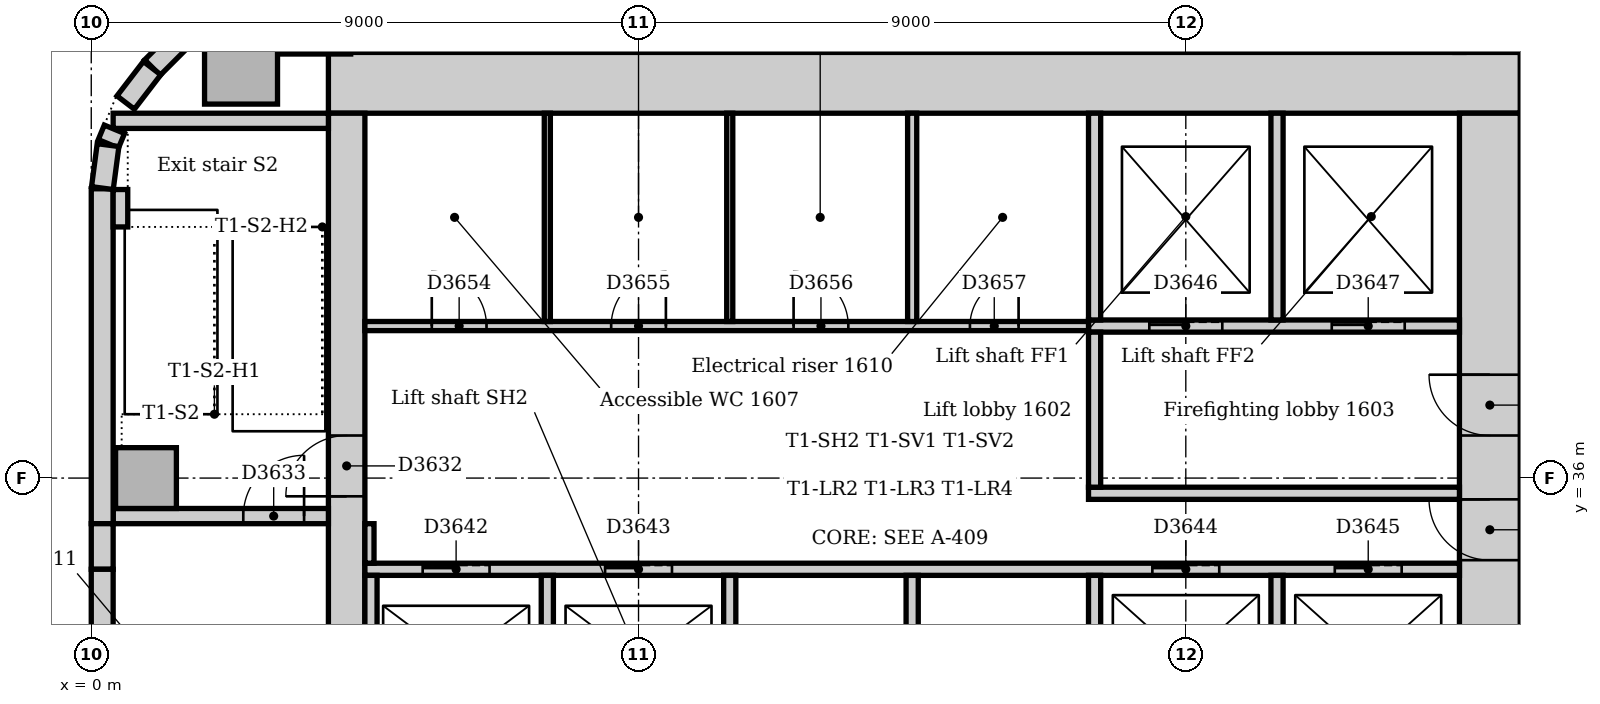
"""IFC4 building model, lengths in metres.
Left out: names, types, materials, properties, quantities, classifications, styles, units other than length and angle.
Written with IfcOpenShell. Run it as: python <this file> out.ifc"""

import sys

from ifc_helpers import new_model, si_unit, direction, frame, frame_2d, origin, origin_2d, place, context, subcontext, project, spatial, rectangle, extrude, element, fill, save


model = new_model("IFC4")
c1 = context("Model", 3, precision=1e-05, world=origin(), true_north=direction((0.0, 1.0)))
c2 = subcontext(c1, "Body", "Model", "MODEL_VIEW")
j1 = project(units=[si_unit("LENGTHUNIT", "METRE"), si_unit("PLANEANGLEUNIT", "RADIAN")], contexts=[c1])
p1 = place(None, origin())
s1 = spatial("IfcSite", under=j1, at=p1, CompositionType="ELEMENT")
p2 = place(p1, origin())
s2 = spatial("IfcBuilding", under=s1, at=p2, CompositionType="ELEMENT")
p3 = place(p2, frame((0.0, 0.0, 71.0)))
s3 = spatial("IfcBuildingStorey", under=s2, at=p3, CompositionType="ELEMENT", Elevation=71.0)
p4 = place(p3, frame((23.5, 42.5, 0.0), z_axis=(0.0, 0.0, 1.0), x_axis=(-1.0, 0.0, 0.0)))
e1 = element("IfcWall", 1, at=p4, inside=s3, PredefinedType="SOLIDWALL", context=c2, shape_type="SweptSolid", body=[
    extrude(rectangle(XDim=19.6, YDim=1.0, at=frame_2d((9.8, 0.0))), origin(), (0.0, 0.0, 1.0), 4.0),
])
p5 = place(p3, frame((23.0, 31.5, 0.0), z_axis=(0.0, 0.0, 1.0), x_axis=(0.0, 1.0, 0.0)))
e2 = element("IfcWall", 2, at=p5, inside=s3, PredefinedType="SOLIDWALL", context=c2, shape_type="SweptSolid", body=[
    extrude(rectangle(XDim=10.5, YDim=1.0, at=frame_2d((5.25, 0.0))), origin(), (0.0, 0.0, 1.0), 4.0),
])
p6 = place(p5, frame((3.15, 0.0, 0.0)))
e3 = element("IfcOpeningElement", 3, at=p6, cuts=e2, PredefinedType="OPENING", context=c2, shape_type="SweptSolid", body=[
    extrude(rectangle(XDim=1.0, YDim=2.1, at=frame_2d((0.5, 1.05))), frame((0.0, 0.51, 0.0), z_axis=(0.0, -1.0, 0.0), x_axis=(1.0, 0.0, 0.0)), (0.0, 0.0, 1.0), 1.02),
])
p7 = place(p5, frame((5.2, 0.0, 0.0)))
e4 = element("IfcOpeningElement", 4, at=p7, cuts=e2, PredefinedType="OPENING", context=c2, shape_type="SweptSolid", body=[
    extrude(rectangle(XDim=1.0, YDim=2.1, at=frame_2d((0.5, 1.05))), frame((0.0, 0.51, 0.0), z_axis=(0.0, -1.0, 0.0), x_axis=(1.0, 0.0, 0.0)), (0.0, 0.0, 1.0), 1.02),
])
p8 = place(p3, frame((4.2, 42.0, 0.0), z_axis=(0.0, 0.0, 1.0), x_axis=(0.0, -1.0, 0.0)))
e5 = element("IfcWall", 5, at=p8, inside=s3, PredefinedType="SOLIDWALL", context=c2, shape_type="SweptSolid", body=[
    extrude(rectangle(XDim=10.5, YDim=0.6, at=frame_2d((5.25, 0.0))), origin(), (0.0, 0.0, 1.0), 4.0),
])
p9 = place(p8, frame((5.3, 0.0, 0.0)))
e6 = element("IfcOpeningElement", 6, at=p9, cuts=e5, PredefinedType="OPENING", context=c2, shape_type="SweptSolid", body=[
    extrude(rectangle(XDim=1.0, YDim=2.1, at=frame_2d((0.5, 1.05))), frame((0.0, 0.31, 0.0), z_axis=(0.0, -1.0, 0.0), x_axis=(1.0, 0.0, 0.0)), (0.0, 0.0, 1.0), 0.62),
])
p10 = place(p3, frame((0.36, 35.375, 0.0), z_axis=(0.0, 0.0, 1.0), x_axis=(1.0, 0.0, 0.0)))
e7 = element("IfcWall", 7, at=p10, inside=s3, PredefinedType="SOLIDWALL", context=c2, shape_type="SweptSolid", body=[
    extrude(rectangle(XDim=3.54, YDim=0.25, at=frame_2d((1.77, 0.0))), origin(), (0.0, 0.0, 1.0), 4.0),
])
p11 = place(p10, frame((2.14, 0.0, 0.0)))
e8 = element("IfcOpeningElement", 8, at=p11, cuts=e7, PredefinedType="OPENING", context=c2, shape_type="SweptSolid", body=[
    extrude(rectangle(XDim=1.0, YDim=2.1, at=frame_2d((0.5, 1.05))), frame((0.0, 0.135, 0.0), z_axis=(0.0, -1.0, 0.0), x_axis=(1.0, 0.0, 0.0)), (0.0, 0.0, 1.0), 0.27),
])
p12 = place(p3, frame((3.9, 41.875, 0.0), z_axis=(0.0, 0.0, 1.0), x_axis=(-1.0, 0.0, 0.0)))
e9 = element("IfcWall", 9, at=p12, inside=s3, PredefinedType="SOLIDWALL", context=c2, shape_type="SweptSolid", body=[
    extrude(rectangle(XDim=3.54, YDim=0.25, at=frame_2d((1.77, 0.0))), origin(), (0.0, 0.0, 1.0), 4.0),
])
for number, where, z_axis, x_axis in (
    (10, (3.667, 43.574, 0.0), (0.0, 0.0, 1.0), (1.0, 0.0, 0.0)),
    (11, (2.463, 42.75, 0.0), (0.0, 0.0, 1.0), (1.0, 0.0, 0.0)),
):
    element("IfcColumn", number, at=place(p3, frame(where, z_axis=z_axis, x_axis=x_axis)), inside=s3, PredefinedType="COLUMN", context=c2, shape_type="SweptSolid", body=[
        extrude(rectangle(XDim=1.2, YDim=1.2, at=origin_2d()), origin(), (0.0, 0.0, 1.0), 3.85),
    ])
p13 = place(p3, frame((0.9, 36.0, 0.0), z_axis=(0.0, 0.0, 1.0), x_axis=(1.0, 0.0, 0.0)))
e12 = element("IfcColumn", 12, at=p13, inside=s3, PredefinedType="COLUMN", context=c2, shape_type="SweptSolid", body=[
    extrude(rectangle(XDim=1.0, YDim=1.0, at=origin_2d()), origin(), (0.0, 0.0, 1.0), 4.0),
])
p14 = place(p3, frame((2.249, 43.994, 0.0), z_axis=(0.0, 0.0, 1.0), x_axis=(-0.707106781187, -0.707106781187, 0.0)))
e13 = element("IfcWall", 13, at=p14, inside=s3, PredefinedType="STANDARD", context=c2, shape_type="SweptSolid", body=[
    extrude(rectangle(XDim=1.757, YDim=0.36, at=frame_2d((0.879, 0.0))), origin(), (0.0, 0.0, 1.0), 3.85),
])
p15 = place(p3, frame((0.18, 40.757, 0.0), z_axis=(0.0, 0.0, 1.0), x_axis=(0.0, -1.0, 0.0)))
e14 = element("IfcWall", 14, at=p15, inside=s3, PredefinedType="STANDARD", context=c2, shape_type="SweptSolid", body=[
    extrude(rectangle(XDim=5.507, YDim=0.36, at=frame_2d((2.754, 0.0))), origin(), (0.0, 0.0, 1.0), 3.85),
])
p16 = place(p3, frame((0.18, 35.25, 0.0), z_axis=(0.0, 0.0, 1.0), x_axis=(0.0, -1.0, 0.0)))
e15 = element("IfcWall", 15, at=p16, inside=s3, PredefinedType="STANDARD", context=c2, shape_type="SweptSolid", body=[
    extrude(rectangle(XDim=0.75, YDim=0.36, at=frame_2d((0.375, 0.0))), origin(), (0.0, 0.0, 1.0), 3.85),
])
p17 = place(p3, frame((0.18, 34.5, 0.0), z_axis=(0.0, 0.0, 1.0), x_axis=(0.0, -1.0, 0.0)))
e16 = element("IfcWall", 16, at=p17, inside=s3, PredefinedType="STANDARD", context=c2, shape_type="SweptSolid", body=[
    extrude(rectangle(XDim=6.0, YDim=0.36, at=frame_2d((3.0, 0.0))), origin(), (0.0, 0.0, 1.0), 3.85),
])
p18 = place(p17, frame((2.1, 0.0, 0.0)))
e17 = element("IfcOpeningElement", 17, at=p18, cuts=e16, PredefinedType="OPENING", context=c2, shape_type="SweptSolid", body=[
    extrude(rectangle(XDim=1.8, YDim=2.4, at=frame_2d((0.9, 1.2))), frame((0.0, 0.19, 0.0), z_axis=(0.0, -1.0, 0.0), x_axis=(1.0, 0.0, 0.0)), (0.0, 0.0, 1.0), 0.38),
])
p19 = place(p3, frame((1.0, 42.741, 0.0), z_axis=(0.0, 0.0, 1.0), x_axis=(-0.608802368033, -0.793321924995, 0.0)))
e18 = element("IfcWall", 18, at=p19, inside=s3, PredefinedType="STANDARD", context=c2, shape_type="SweptSolid", body=[
    extrude(rectangle(XDim=0.713, YDim=0.36, at=frame_2d((0.357, 0.0))), origin(), (0.0, 0.0, 1.0), 3.85),
])
p20 = place(p3, frame((0.381, 41.736, 0.0), z_axis=(0.0, 0.0, 1.0), x_axis=(-0.382773360986, -0.923842277729, 0.0)))
e19 = element("IfcWall", 19, at=p20, inside=s3, PredefinedType="STANDARD", context=c2, shape_type="SweptSolid", body=[
    extrude(rectangle(XDim=0.258, YDim=0.36, at=frame_2d((0.129, 0.0))), origin(), (0.0, 0.0, 1.0), 3.85),
])
p21 = place(p3, frame((0.276, 41.476, 0.0), z_axis=(0.0, 0.0, 1.0), x_axis=(-0.13055608231, -0.99144092581, 0.0)))
e20 = element("IfcWall", 20, at=p21, inside=s3, PredefinedType="STANDARD", context=c2, shape_type="SweptSolid", body=[
    extrude(rectangle(XDim=0.713, YDim=0.36, at=frame_2d((0.356, 0.0))), origin(), (0.0, 0.0, 1.0), 3.85),
])
p22 = place(p3, frame((0.48, 40.13, 0.0), z_axis=(0.0, 0.0, 1.0), x_axis=(0.0, 1.0, 0.0)))
e21 = element("IfcWall", 21, at=p22, inside=s3, PredefinedType="STANDARD", context=c2, shape_type="SweptSolid", body=[
    extrude(rectangle(XDim=0.615, YDim=0.24, at=frame_2d((0.307, 0.0))), origin(), (0.0, 0.0, 1.0), 4.0),
])
p23 = place(p3, frame((16.4, 35.75, 0.0), z_axis=(0.0, 0.0, 1.0), x_axis=(1.0, 0.0, 0.0)))
e22 = element("IfcWall", 22, at=p23, inside=s3, PredefinedType="PARTITIONING", context=c2, shape_type="SweptSolid", body=[
    extrude(rectangle(XDim=6.1, YDim=0.2, at=frame_2d((3.05, 0.0))), origin(), (0.0, 0.0, 1.0), 3.85),
])
p24 = place(p3, frame((16.4, 38.5, 0.0), z_axis=(0.0, 0.0, 1.0), x_axis=(1.0, 0.0, 0.0)))
e23 = element("IfcWall", 23, at=p24, inside=s3, PredefinedType="PARTITIONING", context=c2, shape_type="SweptSolid", body=[
    extrude(rectangle(XDim=6.1, YDim=0.2, at=frame_2d((3.05, 0.0))), origin(), (0.0, 0.0, 1.0), 3.85),
])
p25 = place(p24, frame((1.0, 0.0, 0.0)))
e24 = element("IfcOpeningElement", 24, at=p25, cuts=e23, PredefinedType="OPENING", context=c2, shape_type="SweptSolid", body=[
    extrude(rectangle(XDim=1.2, YDim=2.1, at=frame_2d((0.6, 1.05))), frame((0.0, 0.11, 0.0), z_axis=(0.0, -1.0, 0.0), x_axis=(1.0, 0.0, 0.0)), (0.0, 0.0, 1.0), 0.22),
])
p26 = place(p24, frame((4.0, 0.0, 0.0)))
e25 = element("IfcOpeningElement", 25, at=p26, cuts=e23, PredefinedType="OPENING", context=c2, shape_type="SweptSolid", body=[
    extrude(rectangle(XDim=1.2, YDim=2.1, at=frame_2d((0.6, 1.05))), frame((0.0, 0.11, 0.0), z_axis=(0.0, -1.0, 0.0), x_axis=(1.0, 0.0, 0.0)), (0.0, 0.0, 1.0), 0.22),
])
p27 = place(p3, frame((16.5, 35.85, 0.0), z_axis=(0.0, 0.0, 1.0), x_axis=(0.0, 1.0, 0.0)))
e26 = element("IfcWall", 26, at=p27, inside=s3, PredefinedType="PARTITIONING", context=c2, shape_type="SweptSolid", body=[
    extrude(rectangle(XDim=2.55, YDim=0.2, at=frame_2d((1.275, 0.0))), origin(), (0.0, 0.0, 1.0), 3.85),
])
p28 = place(p3, frame((4.5, 34.5, 0.0), z_axis=(0.0, 0.0, 1.0), x_axis=(1.0, 0.0, 0.0)))
e27 = element("IfcWall", 27, at=p28, inside=s3, PredefinedType="PARTITIONING", context=c2, shape_type="SweptSolid", body=[
    extrude(rectangle(XDim=18.0, YDim=0.2, at=frame_2d((9.0, 0.0))), origin(), (0.0, 0.0, 1.0), 3.85),
])
p29 = place(p28, frame((0.95, 0.0, 0.0)))
e28 = element("IfcOpeningElement", 28, at=p29, cuts=e27, PredefinedType="OPENING", context=c2, shape_type="SweptSolid", body=[
    extrude(rectangle(XDim=1.1, YDim=2.1, at=frame_2d((0.55, 1.05))), frame((0.0, 0.11, 0.0), z_axis=(0.0, -1.0, 0.0), x_axis=(1.0, 0.0, 0.0)), (0.0, 0.0, 1.0), 0.22),
])
p30 = place(p28, frame((3.95, 0.0, 0.0)))
e29 = element("IfcOpeningElement", 29, at=p30, cuts=e27, PredefinedType="OPENING", context=c2, shape_type="SweptSolid", body=[
    extrude(rectangle(XDim=1.1, YDim=2.1, at=frame_2d((0.55, 1.05))), frame((0.0, 0.11, 0.0), z_axis=(0.0, -1.0, 0.0), x_axis=(1.0, 0.0, 0.0)), (0.0, 0.0, 1.0), 0.22),
])
p31 = place(p28, frame((12.95, 0.0, 0.0)))
e30 = element("IfcOpeningElement", 30, at=p31, cuts=e27, PredefinedType="OPENING", context=c2, shape_type="SweptSolid", body=[
    extrude(rectangle(XDim=1.1, YDim=2.1, at=frame_2d((0.55, 1.05))), frame((0.0, 0.11, 0.0), z_axis=(0.0, -1.0, 0.0), x_axis=(1.0, 0.0, 0.0)), (0.0, 0.0, 1.0), 0.22),
])
p32 = place(p28, frame((15.95, 0.0, 0.0)))
e31 = element("IfcOpeningElement", 31, at=p32, cuts=e27, PredefinedType="OPENING", context=c2, shape_type="SweptSolid", body=[
    extrude(rectangle(XDim=1.1, YDim=2.1, at=frame_2d((0.55, 1.05))), frame((0.0, 0.11, 0.0), z_axis=(0.0, -1.0, 0.0), x_axis=(1.0, 0.0, 0.0)), (0.0, 0.0, 1.0), 0.22),
])
for number, where, z_axis, x_axis in (
    (32, (16.5, 38.6, 0.0), (0.0, 0.0, 1.0), (0.0, 1.0, 0.0)),
    (33, (19.5, 38.6, 0.0), (0.0, 0.0, 1.0), (0.0, 1.0, 0.0)),
):
    element("IfcWall", number, at=place(p3, frame(where, z_axis=z_axis, x_axis=x_axis)), inside=s3, PredefinedType="PARTITIONING", context=c2, shape_type="SweptSolid", body=[
        extrude(rectangle(XDim=3.4, YDim=0.2, at=frame_2d((1.7, 0.0))), origin(), (0.0, 0.0, 1.0), 3.85),
    ])
for number, where, z_axis, x_axis in (
    (34, (4.6, 31.75, 0.0), (0.0, 0.0, 1.0), (0.0, 1.0, 0.0)),
    (35, (7.5, 31.75, 0.0), (0.0, 0.0, 1.0), (0.0, 1.0, 0.0)),
    (36, (10.5, 31.75, 0.0), (0.0, 0.0, 1.0), (0.0, 1.0, 0.0)),
    (37, (13.5, 31.75, 0.0), (0.0, 0.0, 1.0), (0.0, 1.0, 0.0)),
    (38, (16.5, 31.75, 0.0), (0.0, 0.0, 1.0), (0.0, 1.0, 0.0)),
    (39, (19.5, 31.75, 0.0), (0.0, 0.0, 1.0), (0.0, 1.0, 0.0)),
):
    element("IfcWall", number, at=place(p3, frame(where, z_axis=z_axis, x_axis=x_axis)), inside=s3, PredefinedType="PARTITIONING", context=c2, shape_type="SweptSolid", body=[
        extrude(rectangle(XDim=2.65, YDim=0.2, at=frame_2d((1.325, 0.0))), origin(), (0.0, 0.0, 1.0), 3.85),
    ])
p33 = place(p3, frame((4.5, 38.5, 0.0), z_axis=(0.0, 0.0, 1.0), x_axis=(1.0, 0.0, 0.0)))
e40 = element("IfcWall", 40, at=p33, inside=s3, PredefinedType="PARTITIONING", context=c2, shape_type="SweptSolid", body=[
    extrude(rectangle(XDim=11.9, YDim=0.15, at=frame_2d((5.95, 0.0))), origin(), (0.0, 0.0, 1.0), 3.85),
])
p34 = place(p33, frame((1.1, 0.0, 0.0)))
e41 = element("IfcOpeningElement", 41, at=p34, cuts=e40, PredefinedType="OPENING", context=c2, shape_type="SweptSolid", body=[
    extrude(rectangle(XDim=0.9, YDim=2.1, at=frame_2d((0.45, 1.05))), frame((0.0, 0.085, 0.0), z_axis=(0.0, -1.0, 0.0), x_axis=(1.0, 0.0, 0.0)), (0.0, 0.0, 1.0), 0.17),
])
p35 = place(p33, frame((4.05, 0.0, 0.0)))
e42 = element("IfcOpeningElement", 42, at=p35, cuts=e40, PredefinedType="OPENING", context=c2, shape_type="SweptSolid", body=[
    extrude(rectangle(XDim=0.9, YDim=2.1, at=frame_2d((0.45, 1.05))), frame((0.0, 0.085, 0.0), z_axis=(0.0, -1.0, 0.0), x_axis=(1.0, 0.0, 0.0)), (0.0, 0.0, 1.0), 0.17),
])
p36 = place(p33, frame((7.05, 0.0, 0.0)))
e43 = element("IfcOpeningElement", 43, at=p36, cuts=e40, PredefinedType="OPENING", context=c2, shape_type="SweptSolid", body=[
    extrude(rectangle(XDim=0.9, YDim=2.1, at=frame_2d((0.45, 1.05))), frame((0.0, 0.085, 0.0), z_axis=(0.0, -1.0, 0.0), x_axis=(1.0, 0.0, 0.0)), (0.0, 0.0, 1.0), 0.17),
])
p37 = place(p33, frame((9.95, 0.0, 0.0)))
e44 = element("IfcOpeningElement", 44, at=p37, cuts=e40, PredefinedType="OPENING", context=c2, shape_type="SweptSolid", body=[
    extrude(rectangle(XDim=0.8, YDim=2.1, at=frame_2d((0.4, 1.05))), frame((0.0, 0.085, 0.0), z_axis=(0.0, -1.0, 0.0), x_axis=(1.0, 0.0, 0.0)), (0.0, 0.0, 1.0), 0.17),
])
p38 = place(p3, frame((4.575, 34.6, 0.0), z_axis=(0.0, 0.0, 1.0), x_axis=(0.0, 1.0, 0.0)))
e45 = element("IfcWall", 45, at=p38, inside=s3, PredefinedType="PARTITIONING", context=c2, shape_type="SweptSolid", body=[
    extrude(rectangle(XDim=0.65, YDim=0.15, at=frame_2d((0.325, 0.0))), origin(), (0.0, 0.0, 1.0), 3.85),
])
p39 = place(p3, frame((13.5, 38.575, 0.0), z_axis=(0.0, 0.0, 1.0), x_axis=(0.0, 1.0, 0.0)))
e46 = element("IfcWall", 46, at=p39, inside=s3, PredefinedType="PARTITIONING", context=c2, shape_type="SweptSolid", body=[
    extrude(rectangle(XDim=3.425, YDim=0.15, at=frame_2d((1.712, 0.0))), origin(), (0.0, 0.0, 1.0), 3.85),
])
for number, where, z_axis, x_axis in (
    (47, (7.5, 38.575, 0.0), (0.0, 0.0, 1.0), (0.0, 1.0, 0.0)),
    (48, (10.5, 38.575, 0.0), (0.0, 0.0, 1.0), (0.0, 1.0, 0.0)),
):
    element("IfcWall", number, at=place(p3, frame(where, z_axis=z_axis, x_axis=x_axis)), inside=s3, PredefinedType="PARTITIONING", context=c2, shape_type="SweptSolid", body=[
        extrude(rectangle(XDim=3.425, YDim=0.1, at=frame_2d((1.712, 0.0))), origin(), (0.0, 0.0, 1.0), 3.85),
    ])
p40 = place(p9, frame((1.0, 0.0, 0.0), z_axis=(0.0, 0.0, 1.0), x_axis=(-1.0, 0.0, 0.0)))
e49 = element("IfcDoor", 49, at=p40, inside=s3, OperationType="SINGLE_SWING_LEFT", PredefinedType="DOOR", context=c2, shape_type="SweptSolid", body=[
    extrude(rectangle(XDim=1.0, YDim=2.1, at=frame_2d((0.5, 1.05))), frame((0.0, 0.025, 0.0), z_axis=(0.0, -1.0, 0.0), x_axis=(1.0, 0.0, 0.0)), (0.0, 0.0, 1.0), 0.05),
])
fill(e6, e49)
p41 = place(p11, origin())
e50 = element("IfcDoor", 50, at=p41, inside=s3, OperationType="SINGLE_SWING_RIGHT", PredefinedType="DOOR", context=c2, shape_type="SweptSolid", body=[
    extrude(rectangle(XDim=1.0, YDim=2.1, at=frame_2d((0.5, 1.05))), frame((0.0, 0.025, 0.0), z_axis=(0.0, -1.0, 0.0), x_axis=(1.0, 0.0, 0.0)), (0.0, 0.0, 1.0), 0.05),
])
fill(e8, e50)
p42 = place(p29, origin())
e51 = element("IfcDoor", 51, at=p42, inside=s3, OperationType="SLIDING_TO_LEFT", PredefinedType="DOOR", context=c2, shape_type="SweptSolid", body=[
    extrude(rectangle(XDim=1.1, YDim=2.1, at=frame_2d((0.55, 1.05))), frame((0.0, 0.025, 0.0), z_axis=(0.0, -1.0, 0.0), x_axis=(1.0, 0.0, 0.0)), (0.0, 0.0, 1.0), 0.05),
])
fill(e28, e51)
p43 = place(p30, origin())
e52 = element("IfcDoor", 52, at=p43, inside=s3, OperationType="SLIDING_TO_LEFT", PredefinedType="DOOR", context=c2, shape_type="SweptSolid", body=[
    extrude(rectangle(XDim=1.1, YDim=2.1, at=frame_2d((0.55, 1.05))), frame((0.0, 0.025, 0.0), z_axis=(0.0, -1.0, 0.0), x_axis=(1.0, 0.0, 0.0)), (0.0, 0.0, 1.0), 0.05),
])
fill(e29, e52)
p44 = place(p31, origin())
e53 = element("IfcDoor", 53, at=p44, inside=s3, OperationType="SLIDING_TO_LEFT", PredefinedType="DOOR", context=c2, shape_type="SweptSolid", body=[
    extrude(rectangle(XDim=1.1, YDim=2.1, at=frame_2d((0.55, 1.05))), frame((0.0, 0.025, 0.0), z_axis=(0.0, -1.0, 0.0), x_axis=(1.0, 0.0, 0.0)), (0.0, 0.0, 1.0), 0.05),
])
fill(e30, e53)
p45 = place(p32, origin())
e54 = element("IfcDoor", 54, at=p45, inside=s3, OperationType="SLIDING_TO_LEFT", PredefinedType="DOOR", context=c2, shape_type="SweptSolid", body=[
    extrude(rectangle(XDim=1.1, YDim=2.1, at=frame_2d((0.55, 1.05))), frame((0.0, 0.025, 0.0), z_axis=(0.0, -1.0, 0.0), x_axis=(1.0, 0.0, 0.0)), (0.0, 0.0, 1.0), 0.05),
])
fill(e31, e54)
p46 = place(p25, origin())
e55 = element("IfcDoor", 55, at=p46, inside=s3, OperationType="SLIDING_TO_LEFT", PredefinedType="DOOR", context=c2, shape_type="SweptSolid", body=[
    extrude(rectangle(XDim=1.2, YDim=2.1, at=frame_2d((0.6, 1.05))), frame((0.0, 0.025, 0.0), z_axis=(0.0, -1.0, 0.0), x_axis=(1.0, 0.0, 0.0)), (0.0, 0.0, 1.0), 0.05),
])
fill(e24, e55)
p47 = place(p26, origin())
e56 = element("IfcDoor", 56, at=p47, inside=s3, OperationType="SLIDING_TO_LEFT", PredefinedType="DOOR", context=c2, shape_type="SweptSolid", body=[
    extrude(rectangle(XDim=1.2, YDim=2.1, at=frame_2d((0.6, 1.05))), frame((0.0, 0.025, 0.0), z_axis=(0.0, -1.0, 0.0), x_axis=(1.0, 0.0, 0.0)), (0.0, 0.0, 1.0), 0.05),
])
fill(e25, e56)
p48 = place(p6, origin())
e57 = element("IfcDoor", 57, at=p48, inside=s3, OperationType="SINGLE_SWING_RIGHT", PredefinedType="DOOR", context=c2, shape_type="SweptSolid", body=[
    extrude(rectangle(XDim=1.0, YDim=2.1, at=frame_2d((0.5, 1.05))), frame((0.0, 0.025, 0.0), z_axis=(0.0, -1.0, 0.0), x_axis=(1.0, 0.0, 0.0)), (0.0, 0.0, 1.0), 0.05),
])
fill(e3, e57)
p49 = place(p7, origin())
e58 = element("IfcDoor", 58, at=p49, inside=s3, OperationType="SINGLE_SWING_RIGHT", PredefinedType="DOOR", context=c2, shape_type="SweptSolid", body=[
    extrude(rectangle(XDim=1.0, YDim=2.1, at=frame_2d((0.5, 1.05))), frame((0.0, 0.025, 0.0), z_axis=(0.0, -1.0, 0.0), x_axis=(1.0, 0.0, 0.0)), (0.0, 0.0, 1.0), 0.05),
])
fill(e4, e58)
p50 = place(p34, origin())
e59 = element("IfcDoor", 59, at=p50, inside=s3, OperationType="SINGLE_SWING_LEFT", PredefinedType="DOOR", context=c2, shape_type="SweptSolid", body=[
    extrude(rectangle(XDim=0.9, YDim=2.1, at=frame_2d((0.45, 1.05))), frame((0.0, 0.025, 0.0), z_axis=(0.0, -1.0, 0.0), x_axis=(1.0, 0.0, 0.0)), (0.0, 0.0, 1.0), 0.05),
])
fill(e41, e59)
p51 = place(p35, origin())
e60 = element("IfcDoor", 60, at=p51, inside=s3, OperationType="SINGLE_SWING_RIGHT", PredefinedType="DOOR", context=c2, shape_type="SweptSolid", body=[
    extrude(rectangle(XDim=0.9, YDim=2.1, at=frame_2d((0.45, 1.05))), frame((0.0, 0.025, 0.0), z_axis=(0.0, -1.0, 0.0), x_axis=(1.0, 0.0, 0.0)), (0.0, 0.0, 1.0), 0.05),
])
fill(e42, e60)
p52 = place(p36, origin())
e61 = element("IfcDoor", 61, at=p52, inside=s3, OperationType="SINGLE_SWING_LEFT", PredefinedType="DOOR", context=c2, shape_type="SweptSolid", body=[
    extrude(rectangle(XDim=0.9, YDim=2.1, at=frame_2d((0.45, 1.05))), frame((0.0, 0.025, 0.0), z_axis=(0.0, -1.0, 0.0), x_axis=(1.0, 0.0, 0.0)), (0.0, 0.0, 1.0), 0.05),
])
fill(e43, e61)
p53 = place(p37, origin())
e62 = element("IfcDoor", 62, at=p53, inside=s3, OperationType="SINGLE_SWING_RIGHT", PredefinedType="DOOR", context=c2, shape_type="SweptSolid", body=[
    extrude(rectangle(XDim=0.8, YDim=2.1, at=frame_2d((0.4, 1.05))), frame((0.0, 0.025, 0.0), z_axis=(0.0, -1.0, 0.0), x_axis=(1.0, 0.0, 0.0)), (0.0, 0.0, 1.0), 0.05),
])
fill(e44, e62)
save(model, sys.argv[1])
